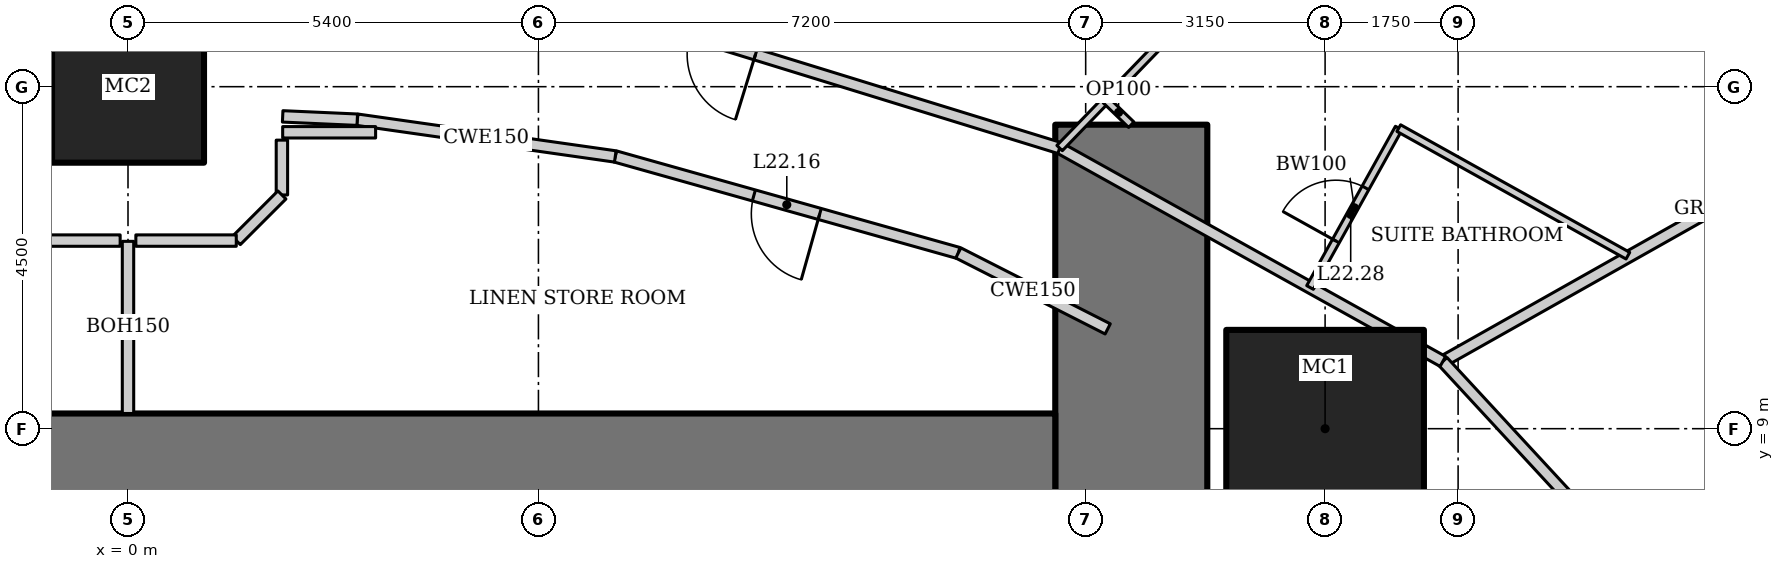
"""IFC4 building model, lengths in metres.
Left out: names, types, materials, properties, quantities, classifications, styles, units other than length and angle.
Written with IfcOpenShell. Run it as: python <this file> out.ifc"""

import sys

from ifc_helpers import new_model, si_unit, direction, frame, frame_2d, origin, origin_2d, place, context, subcontext, project, spatial, rectangle, hollow_rectangle, extrude, element, fill, save


model = new_model("IFC4")
c1 = context("Model", 3, precision=1e-05, world=origin(), true_north=direction((0.0, 1.0)))
c2 = subcontext(c1, "Body", "Model", "MODEL_VIEW")
j1 = project(units=[si_unit("LENGTHUNIT", "METRE"), si_unit("PLANEANGLEUNIT", "RADIAN")], contexts=[c1])
p1 = place(None, origin())
s1 = spatial("IfcSite", under=j1, at=p1, CompositionType="ELEMENT")
p2 = place(p1, origin())
s2 = spatial("IfcBuilding", under=s1, at=p2, CompositionType="ELEMENT")
p3 = place(p2, frame((0.0, 0.0, 94.6)))
s3 = spatial("IfcBuildingStorey", under=s2, at=p3, CompositionType="ELEMENT", Elevation=94.6)
p4 = place(p3, frame((15.75, 9.0, 0.0), z_axis=(0.0, 0.0, 1.0), x_axis=(1.0, 0.0, 0.0)))
e1 = element("IfcColumn", 1, at=p4, inside=s3, PredefinedType="COLUMN", context=c2, shape_type="SweptSolid", body=[
    extrude(hollow_rectangle(XDim=2.6, YDim=2.6, WallThickness=0.13, at=origin_2d()), origin(), (0.0, 0.0, 1.0), 3.6),
])
p5 = place(p3, frame((0.0, 13.5, 0.0), z_axis=(0.0, 0.0, 1.0), x_axis=(1.0, 0.0, 0.0)))
e2 = element("IfcColumn", 2, at=p5, inside=s3, PredefinedType="COLUMN", context=c2, shape_type="SweptSolid", body=[
    extrude(hollow_rectangle(XDim=2.0, YDim=2.0, WallThickness=0.17, at=origin_2d()), origin(), (0.0, 0.0, 1.0), 3.6),
])
p6 = place(p3, frame((13.2, -13.0, 0.0), z_axis=(0.0, 0.0, 1.0), x_axis=(0.0, 1.0, 0.0)))
e3 = element("IfcWall", 3, at=p6, inside=s3, PredefinedType="SHEAR", context=c2, shape_type="SweptSolid", body=[
    extrude(rectangle(XDim=26.0, YDim=2.0, at=frame_2d((13.0, 0.0))), origin(), (0.0, 0.0, 1.0), 3.6),
])
p7 = place(p6, frame((12.1, 0.0, 0.0)))
e4 = element("IfcOpeningElement", 4, at=p7, cuts=e3, PredefinedType="OPENING", context=c2, shape_type="SweptSolid", body=[
    extrude(rectangle(XDim=1.8, YDim=2.1, at=frame_2d((0.9, 1.05))), frame((0.0, 1.01, 0.0), z_axis=(0.0, -1.0, 0.0), x_axis=(1.0, 0.0, 0.0)), (0.0, 0.0, 1.0), 2.02),
])
p8 = place(p3, frame((12.2, 8.0, 0.0), z_axis=(0.0, 0.0, 1.0), x_axis=(-1.0, 0.0, 0.0)))
e5 = element("IfcWall", 5, at=p8, inside=s3, PredefinedType="SHEAR", context=c2, shape_type="SweptSolid", body=[
    extrude(rectangle(XDim=24.4, YDim=2.4, at=frame_2d((12.2, 0.0))), origin(), (0.0, 0.0, 1.0), 3.6),
])
p9 = place(p3, frame((24.482, 13.875, 0.0), z_axis=(0.0, 0.0, 1.0), x_axis=(-0.812791321576, 0.582554948112, 0.0)))
e6 = element("IfcWall", 6, at=p9, inside=s3, PredefinedType="SOLIDWALL", context=c2, shape_type="SweptSolid", body=[
    extrude(rectangle(XDim=8.063, YDim=0.2, at=frame_2d((4.032, 0.0))), origin(), (0.0, 0.0, 1.0), 3.45),
])
p10 = place(p9, frame((1.466, 0.0, 0.5)))
e7 = element("IfcOpeningElement", 7, at=p10, cuts=e6, PredefinedType="OPENING", context=c2, shape_type="SweptSolid", body=[
    extrude(rectangle(XDim=1.5, YDim=2.2, at=frame_2d((0.75, 1.1))), frame((0.0, 0.11, 0.0), z_axis=(0.0, -1.0, 0.0), x_axis=(1.0, 0.0, 0.0)), (0.0, 0.0, 1.0), 0.22),
])
p11 = place(p9, frame((5.097, 0.0, 0.5)))
e8 = element("IfcOpeningElement", 8, at=p11, cuts=e6, PredefinedType="OPENING", context=c2, shape_type="SweptSolid", body=[
    extrude(rectangle(XDim=1.5, YDim=2.2, at=frame_2d((0.75, 1.1))), frame((0.0, 0.11, 0.0), z_axis=(0.0, -1.0, 0.0), x_axis=(1.0, 0.0, 0.0)), (0.0, 0.0, 1.0), 0.22),
])
p12 = place(p3, frame((24.435, 13.909, 0.0), z_axis=(0.0, 0.0, 1.0), x_axis=(-0.871075246657, -0.491149584813, 0.0)))
e9 = element("IfcWall", 9, at=p12, inside=s3, PredefinedType="PARTITIONING", context=c2, shape_type="SweptSolid", body=[
    extrude(rectangle(XDim=8.192, YDim=0.15, at=frame_2d((4.096, 0.0))), origin(), (0.0, 0.0, 1.0), 2.693),
])
p13 = place(p3, frame((21.484, 5.356, 0.0), z_axis=(0.0, 0.0, 1.0), x_axis=(-0.678641806296, 0.734469399463, 0.0)))
e10 = element("IfcWall", 10, at=p13, inside=s3, PredefinedType="PARTITIONING", context=c2, shape_type="SweptSolid", body=[
    extrude(rectangle(XDim=6.166, YDim=0.15, at=frame_2d((3.083, 0.0))), origin(), (0.0, 0.0, 1.0), 3.45),
])
p14 = place(p13, frame((0.15, 0.0, 0.0)))
e11 = element("IfcOpeningElement", 11, at=p14, cuts=e10, PredefinedType="OPENING", context=c2, shape_type="SweptSolid", body=[
    extrude(rectangle(XDim=0.9, YDim=2.1, at=frame_2d((0.45, 1.05))), frame((0.0, 0.085, 0.0), z_axis=(0.0, -1.0, 0.0), x_axis=(1.0, 0.0, 0.0)), (0.0, 0.0, 1.0), 0.17),
])
p15 = place(p3, frame((17.299, 9.885, 0.0), z_axis=(0.0, 0.0, 1.0), x_axis=(-0.873695910579, 0.486472461541, 0.0)))
e12 = element("IfcWall", 12, at=p15, inside=s3, PredefinedType="PARTITIONING", context=c2, shape_type="SweptSolid", body=[
    extrude(rectangle(XDim=5.771, YDim=0.15, at=frame_2d((2.885, 0.0))), origin(), (0.0, 0.0, 1.0), 3.45),
])
p16 = place(p3, frame((12.257, 12.693, 0.0), z_axis=(0.0, 0.0, 1.0), x_axis=(-0.955657956744, 0.294478980085, 0.0)))
e13 = element("IfcWall", 13, at=p16, inside=s3, PredefinedType="PARTITIONING", context=c2, shape_type="SweptSolid", body=[
    extrude(rectangle(XDim=5.236, YDim=0.15, at=frame_2d((2.618, 0.0))), origin(), (0.0, 0.0, 1.0), 3.45),
])
p17 = place(p16, frame((4.186, 0.0, 0.0)))
e14 = element("IfcOpeningElement", 14, at=p17, cuts=e13, PredefinedType="OPENING", context=c2, shape_type="SweptSolid", body=[
    extrude(rectangle(XDim=0.9, YDim=2.1, at=frame_2d((0.45, 1.05))), frame((0.0, 0.085, 0.0), z_axis=(0.0, -1.0, 0.0), x_axis=(1.0, 0.0, 0.0)), (0.0, 0.0, 1.0), 0.17),
])
p18 = place(p3, frame((10.924, 11.312, 0.0), z_axis=(0.0, 0.0, 1.0), x_axis=(-0.962643729928, 0.270771211967, 0.0)))
e15 = element("IfcWall", 15, at=p18, inside=s3, PredefinedType="PARTITIONING", context=c2, shape_type="SweptSolid", body=[
    extrude(rectangle(XDim=4.688, YDim=0.15, at=frame_2d((2.344, 0.0))), origin(), (0.0, 0.0, 1.0), 3.45),
])
p19 = place(p18, frame((1.894, 0.0, 0.0)))
e16 = element("IfcOpeningElement", 16, at=p19, cuts=e15, PredefinedType="OPENING", context=c2, shape_type="SweptSolid", body=[
    extrude(rectangle(XDim=0.9, YDim=2.1, at=frame_2d((0.45, 1.05))), frame((0.0, 0.085, 0.0), z_axis=(0.0, -1.0, 0.0), x_axis=(1.0, 0.0, 0.0)), (0.0, 0.0, 1.0), 0.17),
])
p20 = place(p3, frame((6.411, 12.582, 0.0), z_axis=(0.0, 0.0, 1.0), x_axis=(-0.990002114939, 0.14105251652, 0.0)))
e17 = element("IfcWall", 17, at=p20, inside=s3, PredefinedType="PARTITIONING", context=c2, shape_type="SweptSolid", body=[
    extrude(rectangle(XDim=3.429, YDim=0.15, at=frame_2d((1.714, 0.0))), origin(), (0.0, 0.0, 1.0), 3.45),
])
p21 = place(p3, frame((15.552, 10.858, 0.0), z_axis=(0.0, 0.0, 1.0), x_axis=(0.486445964861, 0.873710663361, 0.0)))
e18 = element("IfcWall", 18, at=p21, inside=s3, PredefinedType="PARTITIONING", context=c2, shape_type="SweptSolid", body=[
    extrude(rectangle(XDim=2.4, YDim=0.1, at=frame_2d((1.2, 0.0))), origin(), (0.0, 0.0, 1.0), 3.45),
])
p22 = place(p21, frame((0.7, 0.0, 0.0)))
e19 = element("IfcOpeningElement", 19, at=p22, cuts=e18, PredefinedType="OPENING", context=c2, shape_type="SweptSolid", body=[
    extrude(rectangle(XDim=0.8, YDim=2.1, at=frame_2d((0.4, 1.05))), frame((0.0, 0.06, 0.0), z_axis=(0.0, -1.0, 0.0), x_axis=(1.0, 0.0, 0.0)), (0.0, 0.0, 1.0), 0.12),
])
p23 = place(p3, frame((16.719, 12.955, 0.0), z_axis=(0.0, 0.0, 1.0), x_axis=(0.873676251648, -0.486507766953, 0.0)))
e20 = element("IfcWall", 20, at=p23, inside=s3, PredefinedType="PARTITIONING", context=c2, shape_type="SweptSolid", body=[
    extrude(rectangle(XDim=3.45, YDim=0.1, at=frame_2d((1.725, 0.0))), origin(), (0.0, 0.0, 1.0), 3.45),
])
p24 = place(p3, frame((16.944, 17.545, 0.0), z_axis=(0.0, 0.0, 1.0), x_axis=(-0.694677175107, -0.719321640426, 0.0)))
e21 = element("IfcWall", 21, at=p24, inside=s3, PredefinedType="PARTITIONING", context=c2, shape_type="SweptSolid", body=[
    extrude(rectangle(XDim=6.746, YDim=0.1, at=frame_2d((3.373, 0.0))), origin(), (0.0, 0.0, 1.0), 2.528),
])
p25 = place(p24, frame((2.923, 0.0, 0.0)))
e22 = element("IfcOpeningElement", 22, at=p25, cuts=e21, PredefinedType="OPENING", context=c2, shape_type="SweptSolid", body=[
    extrude(rectangle(XDim=0.9, YDim=2.1, at=frame_2d((0.45, 1.05))), frame((0.0, 0.06, 0.0), z_axis=(0.0, -1.0, 0.0), x_axis=(1.0, 0.0, 0.0)), (0.0, 0.0, 1.0), 0.12),
])
p26 = place(p3, frame((13.2, 13.0, 0.0), z_axis=(0.0, 0.0, 1.0), x_axis=(-0.719347134512, 0.69465077562, 0.0)))
e23 = element("IfcWall", 23, at=p26, inside=s3, PredefinedType="PARTITIONING", context=c2, shape_type="SweptSolid", body=[
    extrude(rectangle(XDim=0.465, YDim=0.1, at=frame_2d((0.232, 0.0))), origin(), (0.0, 0.0, 1.0), 3.45),
])
p27 = place(p3, frame((3.016, 13.066, 0.0), z_axis=(0.0, 0.0, 1.0), x_axis=(-0.999010128674, 0.044483286824, 0.0)))
e24 = element("IfcWall", 24, at=p27, inside=s3, PredefinedType="PARTITIONING", context=c2, shape_type="SweptSolid", body=[
    extrude(rectangle(XDim=0.982, YDim=0.15, at=frame_2d((0.491, 0.0))), origin(), (0.0, 0.0, 1.0), 3.45),
])
p28 = place(p3, frame((0.0, 9.2, 0.0), z_axis=(0.0, 0.0, 1.0), x_axis=(0.0, 1.0, 0.0)))
e25 = element("IfcWall", 25, at=p28, inside=s3, PredefinedType="PARTITIONING", context=c2, shape_type="SweptSolid", body=[
    extrude(rectangle(XDim=2.265, YDim=0.15, at=frame_2d((1.133, 0.0))), origin(), (0.0, 0.0, 1.0), 3.043),
])
p29 = place(p3, frame((3.258, 12.9, 0.0), z_axis=(0.0, 0.0, 1.0), x_axis=(-1.0, 0.0, 0.0)))
e26 = element("IfcWall", 26, at=p29, inside=s3, PredefinedType="PARTITIONING", context=c2, shape_type="SweptSolid", body=[
    extrude(rectangle(XDim=1.223, YDim=0.15, at=frame_2d((0.611, 0.0))), origin(), (0.0, 0.0, 1.0), 3.45),
])
p30 = place(p3, frame((2.025, 12.797, 0.0), z_axis=(0.0, 0.0, 1.0), x_axis=(0.0, -1.0, 0.0)))
e27 = element("IfcWall", 27, at=p30, inside=s3, PredefinedType="PARTITIONING", context=c2, shape_type="SweptSolid", body=[
    extrude(rectangle(XDim=0.721, YDim=0.15, at=frame_2d((0.361, 0.0))), origin(), (0.0, 0.0, 1.0), 2.749),
])
p31 = place(p3, frame((2.025, 12.075, 0.0), z_axis=(0.0, 0.0, 1.0), x_axis=(-0.707106781187, -0.707106781187, 0.0)))
e28 = element("IfcWall", 28, at=p31, inside=s3, PredefinedType="PARTITIONING", context=c2, shape_type="SweptSolid", body=[
    extrude(rectangle(XDim=0.849, YDim=0.15, at=frame_2d((0.425, 0.0))), origin(), (0.0, 0.0, 1.0), 3.45),
])
for number, where, z_axis, x_axis in (
    (29, (1.425, 11.475, 0.0), (0.0, 0.0, 1.0), (-1.0, 0.0, 0.0)),
    (30, (-0.103, 11.475, 0.0), (0.0, 0.0, 1.0), (-1.0, 0.0, 0.0)),
):
    element("IfcWall", number, at=place(p3, frame(where, z_axis=z_axis, x_axis=x_axis)), inside=s3, PredefinedType="PARTITIONING", context=c2, shape_type="SweptSolid", body=[
        extrude(rectangle(XDim=1.321, YDim=0.15, at=frame_2d((0.661, 0.0))), origin(), (0.0, 0.0, 1.0), 3.45),
    ])
p32 = place(p3, frame((12.89, 10.313, 0.0), z_axis=(0.0, 0.0, 1.0), x_axis=(-0.891372999417, 0.453270532805, 0.0)))
e31 = element("IfcWall", 31, at=p32, inside=s3, PredefinedType="PARTITIONING", context=c2, shape_type="SweptSolid", body=[
    extrude(rectangle(XDim=2.205, YDim=0.15, at=frame_2d((1.103, 0.0))), origin(), (0.0, 0.0, 1.0), 3.45),
])
p33 = place(p19, origin())
e32 = element("IfcDoor", 32, at=p33, inside=s3, OperationType="SINGLE_SWING_LEFT", PredefinedType="DOOR", context=c2, shape_type="SweptSolid", body=[
    extrude(rectangle(XDim=0.9, YDim=2.1, at=frame_2d((0.45, 1.05))), frame((0.0, 0.025, 0.0), z_axis=(0.0, -1.0, 0.0), x_axis=(1.0, 0.0, 0.0)), (0.0, 0.0, 1.0), 0.05),
])
fill(e16, e32)
p34 = place(p22, origin())
e33 = element("IfcDoor", 33, at=p34, inside=s3, OperationType="SINGLE_SWING_LEFT", PredefinedType="DOOR", context=c2, shape_type="SweptSolid", body=[
    extrude(rectangle(XDim=0.8, YDim=2.1, at=frame_2d((0.4, 1.05))), frame((0.0, 0.025, 0.0), z_axis=(0.0, -1.0, 0.0), x_axis=(1.0, 0.0, 0.0)), (0.0, 0.0, 1.0), 0.05),
])
fill(e19, e33)
p35 = place(p17, origin())
e34 = element("IfcDoor", 34, at=p35, inside=s3, OperationType="SINGLE_SWING_LEFT", PredefinedType="DOOR", context=c2, shape_type="SweptSolid", body=[
    extrude(rectangle(XDim=0.9, YDim=2.1, at=frame_2d((0.45, 1.05))), frame((0.0, 0.025, 0.0), z_axis=(0.0, -1.0, 0.0), x_axis=(1.0, 0.0, 0.0)), (0.0, 0.0, 1.0), 0.05),
])
fill(e14, e34)
save(model, sys.argv[1])
